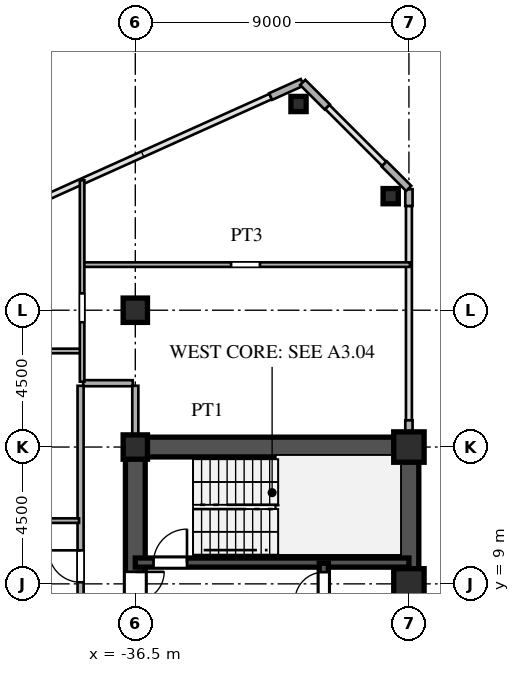
"""IFC4 building model, lengths in metres.
Left out: names, types, materials, properties, quantities, classifications, styles, units other than length and angle.
Written with IfcOpenShell. Run it as: python <this file> out.ifc"""

import sys

from ifc_helpers import new_model, si_unit, direction, frame, frame_2d, origin, origin_2d, place, context, subcontext, project, spatial, rectangle, hollow_rectangle, i_section, extrude, source, transform, mapped, element, fill, save


model = new_model("IFC4")
c1 = context("Model", 3, precision=1e-05, world=origin(), true_north=direction((0.0, 1.0)))
c2 = subcontext(c1, "Body", "Model", "MODEL_VIEW")
j1 = project(units=[si_unit("LENGTHUNIT", "METRE"), si_unit("PLANEANGLEUNIT", "RADIAN")], contexts=[c1])
p1 = place(None, origin())
s1 = spatial("IfcSite", under=j1, at=p1, CompositionType="ELEMENT")
p2 = place(p1, origin())
s2 = spatial("IfcBuilding", under=s1, at=p2, CompositionType="ELEMENT")
p3 = place(p2, frame((0.0, 0.0, 103.2)))
s3 = spatial("IfcBuildingStorey", under=s2, at=p3, CompositionType="ELEMENT", Elevation=103.2)
m1 = source(origin(), c2, "Body", "SweptSolid", [
    extrude(hollow_rectangle(XDim=1.0, YDim=1.0, WallThickness=0.042, at=origin_2d()), origin(), (0.0, 0.0, 1.0), 3.6),
])
for number, where, z_axis, x_axis in (
    (1, (-27.5, 9.0, 0.0), (0.0, 0.0, 1.0), (1.0, 0.0, 0.0)),
    (2, (-27.5, 13.5, 0.0), (0.0, 0.0, 1.0), (1.0, 0.0, 0.0)),
):
    element("IfcColumn", number, at=place(p3, frame(where, z_axis=z_axis, x_axis=x_axis)), inside=s3, PredefinedType="COLUMN", context=c2, shape_type="MappedRepresentation", body=[
        mapped(m1, transform((0.0, 0.0, 0.0), scale=1.0)),
    ])
m2 = source(origin(), c2, "Body", "SweptSolid", [
    extrude(i_section(OverallWidth=0.8, OverallDepth=0.8, WebThickness=0.032, FlangeThickness=0.05, at=origin_2d()), origin(), (0.0, 0.0, 1.0), 3.6),
])
for number, where, z_axis, x_axis in (
    (3, (-36.5, 13.5, 0.0), (0.0, 0.0, 1.0), (1.0, 0.0, 0.0)),
    (4, (-36.5, 18.0, 0.0), (0.0, 0.0, 1.0), (1.0, 0.0, 0.0)),
):
    element("IfcColumn", number, at=place(p3, frame(where, z_axis=z_axis, x_axis=x_axis)), inside=s3, PredefinedType="COLUMN", context=c2, shape_type="MappedRepresentation", body=[
        mapped(m2, transform((0.0, 0.0, 0.0), scale=1.0)),
    ])
m3 = source(origin(), c2, "Body", "SweptSolid", [
    extrude(hollow_rectangle(XDim=0.5, YDim=0.5, WallThickness=0.02, at=origin_2d()), origin(), (0.0, 0.0, 1.0), 3.6),
])
for number, where, z_axis, x_axis in (
    (5, (-28.1, 21.751, 0.0), (0.0, 0.0, 1.0), (1.0, 0.0, 0.0)),
    (6, (-31.131, 24.783, 0.0), (0.0, 0.0, 1.0), (1.0, 0.0, 0.0)),
):
    element("IfcColumn", number, at=place(p3, frame(where, z_axis=z_axis, x_axis=x_axis)), inside=s3, PredefinedType="COLUMN", context=c2, shape_type="MappedRepresentation", body=[
        mapped(m3, transform((0.0, 0.0, 0.0), scale=1.0)),
    ])
p4 = place(p3, frame((-27.5, 13.83, 0.0), z_axis=(0.0, 0.0, 1.0), x_axis=(0.0, 1.0, 0.0)))
e7 = element("IfcWall", 7, at=p4, inside=s3, PredefinedType="SOLIDWALL", context=c2, shape_type="SweptSolid", body=[
    extrude(rectangle(XDim=0.55, YDim=0.24, at=frame_2d((0.275, 0.0))), origin(), (0.0, 0.0, 1.0), 2.88),
])
p5 = place(p3, frame((-27.5, 21.43, 0.0), z_axis=(0.0, 0.0, 1.0), x_axis=(0.0, 1.0, 0.0)))
e8 = element("IfcWall", 8, at=p5, inside=s3, PredefinedType="SOLIDWALL", context=c2, shape_type="SweptSolid", body=[
    extrude(rectangle(XDim=0.55, YDim=0.24, at=frame_2d((0.275, 0.0))), origin(), (0.0, 0.0, 1.0), 3.38),
])
for number, where, z_axis, x_axis in (
    (9, (-27.507, 22.007, 0.0), (0.0, 0.0, 1.0), (-0.707, 0.707, 0.0)),
    (10, (-30.187, 24.687, 0.0), (0.0, 0.0, 1.0), (-0.707, 0.707, 0.0)),
):
    element("IfcWall", number, at=place(p3, frame(where, z_axis=z_axis, x_axis=x_axis)), inside=s3, PredefinedType="SOLIDWALL", context=c2, shape_type="SweptSolid", body=[
        extrude(rectangle(XDim=1.14, YDim=0.24, at=frame_2d((0.57, 0.0))), origin(), (0.0, 0.0, 1.0), 3.38),
    ])
p6 = place(p3, frame((-31.009, 25.496, 0.0), z_axis=(0.0, 0.0, 1.0), x_axis=(-0.911929519623, -0.410346866979, 0.0)))
e11 = element("IfcWall", 11, at=p6, inside=s3, PredefinedType="SOLIDWALL", context=c2, shape_type="SweptSolid", body=[
    extrude(rectangle(XDim=1.14, YDim=0.24, at=frame_2d((0.57, 0.0))), origin(), (0.0, 0.0, 1.0), 3.38),
])
p7 = place(p3, frame((-27.5, 1.3, 0.0), z_axis=(0.0, 0.0, 1.0), x_axis=(0.0, 1.0, 0.0)))
e12 = element("IfcWall", 12, at=p7, inside=s3, PredefinedType="SHEAR", context=c2, shape_type="SweptSolid", body=[
    extrude(rectangle(XDim=12.2, YDim=0.65, at=frame_2d((6.1, 0.0))), origin(), (0.0, 0.0, 1.0), 3.38),
])
p8 = place(p3, frame((-36.5, 13.5, 0.0), z_axis=(0.0, 0.0, 1.0), x_axis=(1.0, 0.0, 0.0)))
e13 = element("IfcWall", 13, at=p8, inside=s3, PredefinedType="SHEAR", context=c2, shape_type="SweptSolid", body=[
    extrude(rectangle(XDim=9.0, YDim=0.65, at=frame_2d((4.5, 0.0))), origin(), (0.0, 0.0, 1.0), 3.38),
])
p9 = place(p3, frame((-36.5, 8.2, 0.0), z_axis=(0.0, 0.0, 1.0), x_axis=(0.0, 1.0, 0.0)))
e14 = element("IfcWall", 14, at=p9, inside=s3, PredefinedType="SHEAR", context=c2, shape_type="SweptSolid", body=[
    extrude(rectangle(XDim=5.45, YDim=0.65, at=frame_2d((2.725, 0.0))), origin(), (0.0, 0.0, 1.0), 3.38),
])
p10 = place(p9, frame((0.245, 0.0, 0.0)))
e15 = element("IfcOpeningElement", 15, at=p10, cuts=e14, PredefinedType="OPENING", context=c2, shape_type="SweptSolid", body=[
    extrude(rectangle(XDim=0.95, YDim=2.15, at=frame_2d((0.475, 1.075))), frame((0.0, 0.335, 0.0), z_axis=(0.0, -1.0, 0.0), x_axis=(1.0, 0.0, 0.0)), (0.0, 0.0, 1.0), 0.67),
])
p11 = place(p3, frame((-36.5, 9.7, 0.0), z_axis=(0.0, 0.0, 1.0), x_axis=(1.0, 0.0, 0.0)))
e16 = element("IfcWall", 16, at=p11, inside=s3, PredefinedType="SHEAR", context=c2, shape_type="SweptSolid", body=[
    extrude(rectangle(XDim=9.0, YDim=0.3, at=frame_2d((4.5, 0.0))), origin(), (0.0, 0.0, 1.0), 3.38),
])
p12 = place(p11, frame((0.6, 0.0, 0.0)))
e17 = element("IfcOpeningElement", 17, at=p12, cuts=e16, PredefinedType="OPENING", context=c2, shape_type="SweptSolid", body=[
    extrude(rectangle(XDim=1.1, YDim=2.2, at=frame_2d((0.55, 1.1))), frame((0.0, 0.16, 0.0), z_axis=(0.0, -1.0, 0.0), x_axis=(1.0, 0.0, 0.0)), (0.0, 0.0, 1.0), 0.32),
])
p13 = place(p3, frame((-30.3, 8.15, 0.0), z_axis=(0.0, 0.0, 1.0), x_axis=(0.0, 1.0, 0.0)))
e18 = element("IfcWall", 18, at=p13, inside=s3, PredefinedType="SHEAR", context=c2, shape_type="SweptSolid", body=[
    extrude(rectangle(XDim=1.53, YDim=0.3, at=frame_2d((0.765, 0.0))), origin(), (0.0, 0.0, 1.0), 3.38),
])
p14 = place(p13, frame((0.285, 0.0, 0.0)))
e19 = element("IfcOpeningElement", 19, at=p14, cuts=e18, PredefinedType="OPENING", context=c2, shape_type="SweptSolid", body=[
    extrude(rectangle(XDim=0.95, YDim=2.15, at=frame_2d((0.475, 1.075))), frame((0.0, 0.16, 0.0), z_axis=(0.0, -1.0, 0.0), x_axis=(1.0, 0.0, 0.0)), (0.0, 0.0, 1.0), 0.32),
])
p15 = place(p3, frame((-42.5, 11.08, 0.0), z_axis=(0.0, 0.0, 1.0), x_axis=(1.0, 0.0, 0.0)))
e20 = element("IfcWall", 20, at=p15, inside=s3, PredefinedType="PARTITIONING", context=c2, shape_type="SweptSolid", body=[
    extrude(rectangle(XDim=4.15, YDim=0.15, at=frame_2d((2.075, 0.0))), origin(), (0.0, 0.0, 1.0), 3.38),
])
p16 = place(p15, frame((1.6, 0.0, 0.0)))
e21 = element("IfcOpeningElement", 21, at=p16, cuts=e20, PredefinedType="OPENING", context=c2, shape_type="SweptSolid", body=[
    extrude(rectangle(XDim=0.95, YDim=2.15, at=frame_2d((0.475, 1.075))), frame((0.0, 0.085, 0.0), z_axis=(0.0, -1.0, 0.0), x_axis=(1.0, 0.0, 0.0)), (0.0, 0.0, 1.0), 0.17),
])
p17 = place(p3, frame((-38.215, 15.6, 0.0), z_axis=(0.0, 0.0, 1.0), x_axis=(1.0, 0.0, 0.0)))
e22 = element("IfcWall", 22, at=p17, inside=s3, PredefinedType="PARTITIONING", context=c2, shape_type="SweptSolid", body=[
    extrude(rectangle(XDim=1.63, YDim=0.2, at=frame_2d((0.815, 0.0))), origin(), (0.0, 0.0, 1.0), 3.38),
])
p18 = place(p3, frame((-42.5, 16.66, 0.0), z_axis=(0.0, 0.0, 1.0), x_axis=(1.0, 0.0, 0.0)))
e23 = element("IfcWall", 23, at=p18, inside=s3, PredefinedType="PARTITIONING", context=c2, shape_type="SweptSolid", body=[
    extrude(rectangle(XDim=4.2, YDim=0.15, at=frame_2d((2.1, 0.0))), origin(), (0.0, 0.0, 1.0), 3.38),
])
p19 = place(p3, frame((-38.2, 19.5, 0.0), z_axis=(0.0, 0.0, 1.0), x_axis=(1.0, 0.0, 0.0)))
e24 = element("IfcWall", 24, at=p19, inside=s3, PredefinedType="PARTITIONING", context=c2, shape_type="SweptSolid", body=[
    extrude(rectangle(XDim=10.735, YDim=0.15, at=frame_2d((5.367, 0.0))), origin(), (0.0, 0.0, 1.0), 3.38),
])
p20 = place(p19, frame((4.85, 0.0, 0.0)))
e25 = element("IfcOpeningElement", 25, at=p20, cuts=e24, PredefinedType="OPENING", context=c2, shape_type="SweptSolid", body=[
    extrude(rectangle(XDim=0.95, YDim=2.15, at=frame_2d((0.475, 1.075))), frame((0.0, 0.085, 0.0), z_axis=(0.0, -1.0, 0.0), x_axis=(1.0, 0.0, 0.0)), (0.0, 0.0, 1.0), 0.17),
])
p21 = place(p3, frame((-38.3, -15.515, 0.0), z_axis=(0.0, 0.0, 1.0), x_axis=(0.0, 1.0, 0.0)))
e26 = element("IfcWall", 26, at=p21, inside=s3, PredefinedType="PARTITIONING", context=c2, shape_type="SweptSolid", body=[
    extrude(rectangle(XDim=31.03, YDim=0.2, at=frame_2d((15.515, 0.0))), origin(), (0.0, 0.0, 1.0), 3.38),
])
p22 = place(p21, frame((0.617, 0.0, 0.0)))
e27 = element("IfcOpeningElement", 27, at=p22, cuts=e26, PredefinedType="OPENING", context=c2, shape_type="SweptSolid", body=[
    extrude(rectangle(XDim=1.05, YDim=2.25, at=frame_2d((0.525, 1.125))), frame((0.0, 0.11, 0.0), z_axis=(0.0, -1.0, 0.0), x_axis=(1.0, 0.0, 0.0)), (0.0, 0.0, 1.0), 0.22),
])
p23 = place(p21, frame((11.28, 0.0, 0.0)))
e28 = element("IfcOpeningElement", 28, at=p23, cuts=e26, PredefinedType="OPENING", context=c2, shape_type="SweptSolid", body=[
    extrude(rectangle(XDim=1.05, YDim=2.25, at=frame_2d((0.525, 1.125))), frame((0.0, 0.11, 0.0), z_axis=(0.0, -1.0, 0.0), x_axis=(1.0, 0.0, 0.0)), (0.0, 0.0, 1.0), 0.22),
])
p24 = place(p21, frame((24.567, 0.0, 0.0)))
e29 = element("IfcOpeningElement", 29, at=p24, cuts=e26, PredefinedType="OPENING", context=c2, shape_type="SweptSolid", body=[
    extrude(rectangle(XDim=1.05, YDim=2.25, at=frame_2d((0.525, 1.125))), frame((0.0, 0.11, 0.0), z_axis=(0.0, -1.0, 0.0), x_axis=(1.0, 0.0, 0.0)), (0.0, 0.0, 1.0), 0.22),
])
p25 = place(p3, frame((-38.25, 15.65, 0.0), z_axis=(0.0, 0.0, 1.0), x_axis=(0.0, 1.0, 0.0)))
e30 = element("IfcWall", 30, at=p25, inside=s3, PredefinedType="PARTITIONING", context=c2, shape_type="SweptSolid", body=[
    extrude(rectangle(XDim=6.623, YDim=0.15, at=frame_2d((3.312, 0.0))), origin(), (0.0, 0.0, 1.0), 3.38),
])
p26 = place(p25, frame((1.954, 0.0, 0.0)))
e31 = element("IfcOpeningElement", 31, at=p26, cuts=e30, PredefinedType="OPENING", context=c2, shape_type="SweptSolid", body=[
    extrude(rectangle(XDim=0.95, YDim=2.15, at=frame_2d((0.475, 1.075))), frame((0.0, 0.085, 0.0), z_axis=(0.0, -1.0, 0.0), x_axis=(1.0, 0.0, 0.0)), (0.0, 0.0, 1.0), 0.17),
])
p27 = place(p3, frame((-36.5, 13.83, 0.0), z_axis=(0.0, 0.0, 1.0), x_axis=(0.0, 1.0, 0.0)))
e32 = element("IfcWall", 32, at=p27, inside=s3, PredefinedType="PARTITIONING", context=c2, shape_type="SweptSolid", body=[
    extrude(rectangle(XDim=1.685, YDim=0.2, at=frame_2d((0.842, 0.0))), origin(), (0.0, 0.0, 1.0), 2.68),
])
m4 = source(origin(), c2, "Body", "SweptSolid", [
    extrude(rectangle(XDim=0.95, YDim=2.15, at=frame_2d((0.475, 1.075))), frame((0.0, 0.025, 0.0), z_axis=(0.0, -1.0, 0.0), x_axis=(1.0, 0.0, 0.0)), (0.0, 0.0, 1.0), 0.05),
])
p28 = place(p10, frame((0.95, 0.0, 0.0), z_axis=(0.0, 0.0, 1.0), x_axis=(-1.0, 0.0, 0.0)))
e33 = element("IfcDoor", 33, at=p28, inside=s3, OperationType="SINGLE_SWING_RIGHT", PredefinedType="DOOR", context=c2, shape_type="MappedRepresentation", body=[
    mapped(m4, transform((0.0, 0.0, 0.0), scale=1.0)),
])
fill(e15, e33)
m5 = source(origin(), c2, "Body", "SweptSolid", [
    extrude(rectangle(XDim=1.1, YDim=2.2, at=frame_2d((0.55, 1.1))), frame((0.0, 0.025, 0.0), z_axis=(0.0, -1.0, 0.0), x_axis=(1.0, 0.0, 0.0)), (0.0, 0.0, 1.0), 0.05),
])
p29 = place(p12, origin())
e34 = element("IfcDoor", 34, at=p29, inside=s3, OperationType="SINGLE_SWING_RIGHT", PredefinedType="DOOR", context=c2, shape_type="MappedRepresentation", body=[
    mapped(m5, transform((0.0, 0.0, 0.0), scale=1.0)),
])
fill(e17, e34)
p30 = place(p14, origin())
e35 = element("IfcDoor", 35, at=p30, inside=s3, OperationType="SINGLE_SWING_LEFT", PredefinedType="DOOR", context=c2, shape_type="MappedRepresentation", body=[
    mapped(m4, transform((0.0, 0.0, 0.0), scale=1.0)),
])
fill(e19, e35)
m6 = source(origin(), c2, "Body", "SweptSolid", [
    extrude(rectangle(XDim=1.05, YDim=2.25, at=frame_2d((0.525, 1.125))), frame((0.0, 0.025, 0.0), z_axis=(0.0, -1.0, 0.0), x_axis=(1.0, 0.0, 0.0)), (0.0, 0.0, 1.0), 0.05),
])
p31 = place(p24, origin())
e36 = element("IfcDoor", 36, at=p31, inside=s3, OperationType="SINGLE_SWING_RIGHT", PredefinedType="DOOR", context=c2, shape_type="MappedRepresentation", body=[
    mapped(m6, transform((0.0, 0.0, 0.0), scale=1.0)),
])
fill(e29, e36)
save(model, sys.argv[1])
